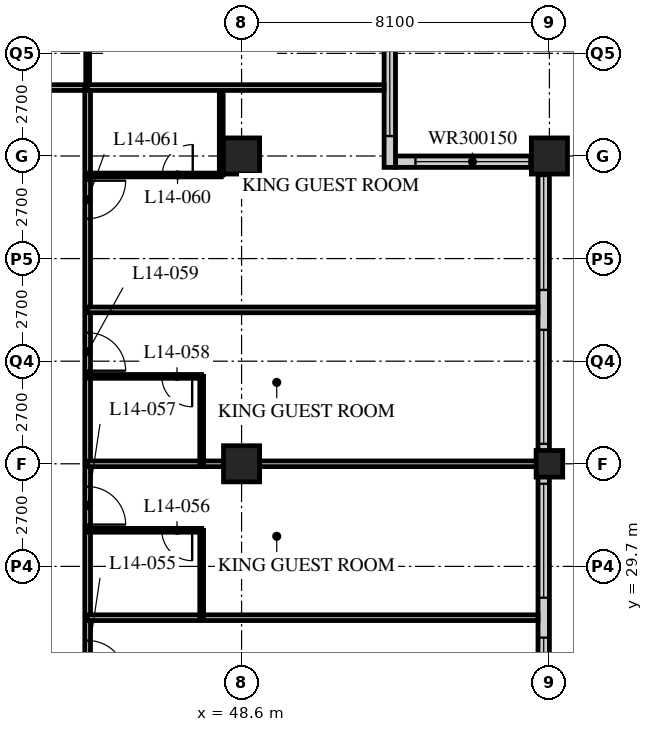
"""IFC4 building model, lengths in metres.
Left out: names, types, materials, properties, quantities, classifications, styles, units other than length and angle.
Written with IfcOpenShell. Run it as: python <this file> out.ifc"""

import sys

from ifc_helpers import new_model, si_unit, direction, frame, frame_2d, origin, origin_2d, place, context, subcontext, project, spatial, rectangle, hollow_rectangle, extrude, element, fill, save


model = new_model("IFC4")
c1 = context("Model", 3, precision=1e-05, world=origin(), true_north=direction((0.0, 1.0)))
c2 = subcontext(c1, "Body", "Model", "MODEL_VIEW")
j1 = project(units=[si_unit("LENGTHUNIT", "METRE"), si_unit("PLANEANGLEUNIT", "RADIAN")], contexts=[c1])
p1 = place(None, origin())
s1 = spatial("IfcSite", under=j1, at=p1, CompositionType="ELEMENT")
p2 = place(p1, origin())
s2 = spatial("IfcBuilding", under=s1, at=p2, CompositionType="ELEMENT")
p3 = place(p2, frame((0.0, 0.0, 60.2)))
s3 = spatial("IfcBuildingStorey", under=s2, at=p3, CompositionType="ELEMENT", Elevation=60.2)
for number, where, z_axis, x_axis in (
    (1, (48.6, 32.4, 0.0), (0.0, 0.0, 1.0), (1.0, 0.0, 0.0)),
    (2, (48.6, 40.5, 0.0), (0.0, 0.0, 1.0), (1.0, 0.0, 0.0)),
):
    element("IfcColumn", number, at=place(p3, frame(where, z_axis=z_axis, x_axis=x_axis)), inside=s3, PredefinedType="COLUMN", context=c2, shape_type="SweptSolid", body=[
        extrude(hollow_rectangle(XDim=0.95, YDim=0.95, WallThickness=0.095, at=origin_2d()), origin(), (0.0, 0.0, 1.0), 3.4),
    ])
p4 = place(p3, frame((56.7, 32.4, 0.0), z_axis=(0.0, 0.0, 1.0), x_axis=(1.0, 0.0, 0.0)))
e3 = element("IfcColumn", 3, at=p4, inside=s3, PredefinedType="COLUMN", context=c2, shape_type="SweptSolid", body=[
    extrude(hollow_rectangle(XDim=0.7, YDim=0.7, WallThickness=0.06, at=origin_2d()), origin(), (0.0, 0.0, 1.0), 3.4),
])
p5 = place(p3, frame((56.7, 40.5, 0.0), z_axis=(0.0, 0.0, 1.0), x_axis=(1.0, 0.0, 0.0)))
e4 = element("IfcColumn", 4, at=p5, inside=s3, PredefinedType="COLUMN", context=c2, shape_type="SweptSolid", body=[
    extrude(hollow_rectangle(XDim=0.95, YDim=0.95, WallThickness=0.095, at=origin_2d()), origin(), (0.0, 0.0, 1.0), 3.4),
])
p6 = place(p3, frame((56.55, 8.4, 0.0), z_axis=(0.0, 0.0, 1.0), x_axis=(0.0, 1.0, 0.0)))
e5 = element("IfcWall", 5, at=p6, inside=s3, PredefinedType="SOLIDWALL", context=c2, shape_type="SweptSolid", body=[
    extrude(rectangle(XDim=32.1, YDim=0.3, at=frame_2d((16.05, 0.0))), origin(), (0.0, 0.0, 1.0), 3.19),
])
p7 = place(p6, frame((0.225, 0.0, 0.9)))
e6 = element("IfcOpeningElement", 6, at=p7, cuts=e5, PredefinedType="OPENING", context=c2, shape_type="SweptSolid", body=[
    extrude(rectangle(XDim=3.0, YDim=2.0, at=frame_2d((1.5, 1.0))), frame((0.0, 0.16, 0.0), z_axis=(0.0, -1.0, 0.0), x_axis=(1.0, 0.0, 0.0)), (0.0, 0.0, 1.0), 0.32),
])
p8 = place(p6, frame((4.275, 0.0, 0.9)))
e7 = element("IfcOpeningElement", 7, at=p8, cuts=e5, PredefinedType="OPENING", context=c2, shape_type="SweptSolid", body=[
    extrude(rectangle(XDim=3.0, YDim=2.0, at=frame_2d((1.5, 1.0))), frame((0.0, 0.16, 0.0), z_axis=(0.0, -1.0, 0.0), x_axis=(1.0, 0.0, 0.0)), (0.0, 0.0, 1.0), 0.32),
])
p9 = place(p6, frame((8.325, 0.0, 0.9)))
e8 = element("IfcOpeningElement", 8, at=p9, cuts=e5, PredefinedType="OPENING", context=c2, shape_type="SweptSolid", body=[
    extrude(rectangle(XDim=3.0, YDim=2.0, at=frame_2d((1.5, 1.0))), frame((0.0, 0.16, 0.0), z_axis=(0.0, -1.0, 0.0), x_axis=(1.0, 0.0, 0.0)), (0.0, 0.0, 1.0), 0.32),
])
p10 = place(p6, frame((12.375, 0.0, 0.9)))
e9 = element("IfcOpeningElement", 9, at=p10, cuts=e5, PredefinedType="OPENING", context=c2, shape_type="SweptSolid", body=[
    extrude(rectangle(XDim=3.0, YDim=2.0, at=frame_2d((1.5, 1.0))), frame((0.0, 0.16, 0.0), z_axis=(0.0, -1.0, 0.0), x_axis=(1.0, 0.0, 0.0)), (0.0, 0.0, 1.0), 0.32),
])
p11 = place(p6, frame((16.425, 0.0, 0.9)))
e10 = element("IfcOpeningElement", 10, at=p11, cuts=e5, PredefinedType="OPENING", context=c2, shape_type="SweptSolid", body=[
    extrude(rectangle(XDim=3.0, YDim=2.0, at=frame_2d((1.5, 1.0))), frame((0.0, 0.16, 0.0), z_axis=(0.0, -1.0, 0.0), x_axis=(1.0, 0.0, 0.0)), (0.0, 0.0, 1.0), 0.32),
])
p12 = place(p6, frame((20.475, 0.0, 0.9)))
e11 = element("IfcOpeningElement", 11, at=p12, cuts=e5, PredefinedType="OPENING", context=c2, shape_type="SweptSolid", body=[
    extrude(rectangle(XDim=3.0, YDim=2.0, at=frame_2d((1.5, 1.0))), frame((0.0, 0.16, 0.0), z_axis=(0.0, -1.0, 0.0), x_axis=(1.0, 0.0, 0.0)), (0.0, 0.0, 1.0), 0.32),
])
p13 = place(p6, frame((24.525, 0.0, 0.9)))
e12 = element("IfcOpeningElement", 12, at=p13, cuts=e5, PredefinedType="OPENING", context=c2, shape_type="SweptSolid", body=[
    extrude(rectangle(XDim=3.0, YDim=2.0, at=frame_2d((1.5, 1.0))), frame((0.0, 0.16, 0.0), z_axis=(0.0, -1.0, 0.0), x_axis=(1.0, 0.0, 0.0)), (0.0, 0.0, 1.0), 0.32),
])
p14 = place(p6, frame((28.575, 0.0, 0.9)))
e13 = element("IfcOpeningElement", 13, at=p14, cuts=e5, PredefinedType="OPENING", context=c2, shape_type="SweptSolid", body=[
    extrude(rectangle(XDim=3.0, YDim=2.0, at=frame_2d((1.5, 1.0))), frame((0.0, 0.16, 0.0), z_axis=(0.0, -1.0, 0.0), x_axis=(1.0, 0.0, 0.0)), (0.0, 0.0, 1.0), 0.32),
])
p15 = place(p3, frame((56.4, 40.35, 0.0), z_axis=(0.0, 0.0, 1.0), x_axis=(-1.0, 0.0, 0.0)))
e14 = element("IfcWall", 14, at=p15, inside=s3, PredefinedType="SOLIDWALL", context=c2, shape_type="SweptSolid", body=[
    extrude(rectangle(XDim=3.75, YDim=0.3, at=frame_2d((1.875, 0.0))), origin(), (0.0, 0.0, 1.0), 3.19),
])
p16 = place(p15, frame((0.225, 0.0, 0.9)))
e15 = element("IfcOpeningElement", 15, at=p16, cuts=e14, PredefinedType="OPENING", context=c2, shape_type="SweptSolid", body=[
    extrude(rectangle(XDim=3.0, YDim=1.5, at=frame_2d((1.5, 0.75))), frame((0.0, 0.16, 0.0), z_axis=(0.0, -1.0, 0.0), x_axis=(1.0, 0.0, 0.0)), (0.0, 0.0, 1.0), 0.32),
])
p17 = place(p3, frame((52.5, 40.2, 0.0), z_axis=(0.0, 0.0, 1.0), x_axis=(0.0, 1.0, 0.0)))
e16 = element("IfcWall", 16, at=p17, inside=s3, PredefinedType="SOLIDWALL", context=c2, shape_type="SweptSolid", body=[
    extrude(rectangle(XDim=4.35, YDim=0.3, at=frame_2d((2.175, 0.0))), origin(), (0.0, 0.0, 1.0), 3.19),
])
p18 = place(p17, frame((0.825, 0.0, 0.9)))
e17 = element("IfcOpeningElement", 17, at=p18, cuts=e16, PredefinedType="OPENING", context=c2, shape_type="SweptSolid", body=[
    extrude(rectangle(XDim=3.0, YDim=1.5, at=frame_2d((1.5, 0.75))), frame((0.0, 0.16, 0.0), z_axis=(0.0, -1.0, 0.0), x_axis=(1.0, 0.0, 0.0)), (0.0, 0.0, 1.0), 0.32),
])
p19 = place(p3, frame((12.15, 42.3, 0.0), z_axis=(0.0, 0.0, 1.0), x_axis=(1.0, 0.0, 0.0)))
e18 = element("IfcWall", 18, at=p19, inside=s3, PredefinedType="PARTITIONING", context=c2, shape_type="SweptSolid", body=[
    extrude(rectangle(XDim=32.4, YDim=0.15, at=frame_2d((16.2, 0.0))), origin(), (0.0, 0.0, 1.0), 3.19),
])
p20 = place(p19, frame((6.5, 0.0, 0.0)))
e19 = element("IfcOpeningElement", 19, at=p20, cuts=e18, PredefinedType="OPENING", context=c2, shape_type="SweptSolid", body=[
    extrude(rectangle(XDim=1.0, YDim=2.1, at=frame_2d((0.5, 1.05))), frame((0.0, 0.085, 0.0), z_axis=(0.0, -1.0, 0.0), x_axis=(1.0, 0.0, 0.0)), (0.0, 0.0, 1.0), 0.17),
])
p21 = place(p19, frame((10.55, 0.0, 0.0)))
e20 = element("IfcOpeningElement", 20, at=p21, cuts=e18, PredefinedType="OPENING", context=c2, shape_type="SweptSolid", body=[
    extrude(rectangle(XDim=1.0, YDim=2.1, at=frame_2d((0.5, 1.05))), frame((0.0, 0.085, 0.0), z_axis=(0.0, -1.0, 0.0), x_axis=(1.0, 0.0, 0.0)), (0.0, 0.0, 1.0), 0.17),
])
p22 = place(p19, frame((14.6, 0.0, 0.0)))
e21 = element("IfcOpeningElement", 21, at=p22, cuts=e18, PredefinedType="OPENING", context=c2, shape_type="SweptSolid", body=[
    extrude(rectangle(XDim=1.0, YDim=2.1, at=frame_2d((0.5, 1.05))), frame((0.0, 0.085, 0.0), z_axis=(0.0, -1.0, 0.0), x_axis=(1.0, 0.0, 0.0)), (0.0, 0.0, 1.0), 0.17),
])
p23 = place(p19, frame((18.65, 0.0, 0.0)))
e22 = element("IfcOpeningElement", 22, at=p23, cuts=e18, PredefinedType="OPENING", context=c2, shape_type="SweptSolid", body=[
    extrude(rectangle(XDim=1.0, YDim=2.1, at=frame_2d((0.5, 1.05))), frame((0.0, 0.085, 0.0), z_axis=(0.0, -1.0, 0.0), x_axis=(1.0, 0.0, 0.0)), (0.0, 0.0, 1.0), 0.17),
])
p24 = place(p19, frame((22.7, 0.0, 0.0)))
e23 = element("IfcOpeningElement", 23, at=p24, cuts=e18, PredefinedType="OPENING", context=c2, shape_type="SweptSolid", body=[
    extrude(rectangle(XDim=1.0, YDim=2.1, at=frame_2d((0.5, 1.05))), frame((0.0, 0.085, 0.0), z_axis=(0.0, -1.0, 0.0), x_axis=(1.0, 0.0, 0.0)), (0.0, 0.0, 1.0), 0.17),
])
p25 = place(p19, frame((26.75, 0.0, 0.0)))
e24 = element("IfcOpeningElement", 24, at=p25, cuts=e18, PredefinedType="OPENING", context=c2, shape_type="SweptSolid", body=[
    extrude(rectangle(XDim=1.0, YDim=2.1, at=frame_2d((0.5, 1.05))), frame((0.0, 0.085, 0.0), z_axis=(0.0, -1.0, 0.0), x_axis=(1.0, 0.0, 0.0)), (0.0, 0.0, 1.0), 0.17),
])
p26 = place(p19, frame((28.775, 0.0, 0.0)))
e25 = element("IfcOpeningElement", 25, at=p26, cuts=e18, PredefinedType="OPENING", context=c2, shape_type="SweptSolid", body=[
    extrude(rectangle(XDim=1.0, YDim=2.1, at=frame_2d((0.5, 1.05))), frame((0.0, 0.085, 0.0), z_axis=(0.0, -1.0, 0.0), x_axis=(1.0, 0.0, 0.0)), (0.0, 0.0, 1.0), 0.17),
])
p27 = place(p19, frame((2.625, 0.0, 0.0)))
e26 = element("IfcOpeningElement", 26, at=p27, cuts=e18, PredefinedType="OPENING", context=c2, shape_type="SweptSolid", body=[
    extrude(rectangle(XDim=1.0, YDim=2.1, at=frame_2d((0.5, 1.05))), frame((0.0, 0.085, 0.0), z_axis=(0.0, -1.0, 0.0), x_axis=(1.0, 0.0, 0.0)), (0.0, 0.0, 1.0), 0.17),
])
p28 = place(p3, frame((44.55, 12.15, 0.0), z_axis=(0.0, 0.0, 1.0), x_axis=(0.0, 1.0, 0.0)))
e27 = element("IfcWall", 27, at=p28, inside=s3, PredefinedType="PARTITIONING", context=c2, shape_type="SweptSolid", body=[
    extrude(rectangle(XDim=30.15, YDim=0.15, at=frame_2d((15.075, 0.0))), origin(), (0.0, 0.0, 1.0), 3.19),
])
p29 = place(p28, frame((2.75, 0.0, 0.0)))
e28 = element("IfcOpeningElement", 28, at=p29, cuts=e27, PredefinedType="OPENING", context=c2, shape_type="SweptSolid", body=[
    extrude(rectangle(XDim=1.0, YDim=2.1, at=frame_2d((0.5, 1.05))), frame((0.0, 0.085, 0.0), z_axis=(0.0, -1.0, 0.0), x_axis=(1.0, 0.0, 0.0)), (0.0, 0.0, 1.0), 0.17),
])
p30 = place(p28, frame((6.5, 0.0, 0.0)))
e29 = element("IfcOpeningElement", 29, at=p30, cuts=e27, PredefinedType="OPENING", context=c2, shape_type="SweptSolid", body=[
    extrude(rectangle(XDim=1.0, YDim=2.1, at=frame_2d((0.5, 1.05))), frame((0.0, 0.085, 0.0), z_axis=(0.0, -1.0, 0.0), x_axis=(1.0, 0.0, 0.0)), (0.0, 0.0, 1.0), 0.17),
])
p31 = place(p28, frame((10.55, 0.0, 0.0)))
e30 = element("IfcOpeningElement", 30, at=p31, cuts=e27, PredefinedType="OPENING", context=c2, shape_type="SweptSolid", body=[
    extrude(rectangle(XDim=1.0, YDim=2.1, at=frame_2d((0.5, 1.05))), frame((0.0, 0.085, 0.0), z_axis=(0.0, -1.0, 0.0), x_axis=(1.0, 0.0, 0.0)), (0.0, 0.0, 1.0), 0.17),
])
p32 = place(p28, frame((14.6, 0.0, 0.0)))
e31 = element("IfcOpeningElement", 31, at=p32, cuts=e27, PredefinedType="OPENING", context=c2, shape_type="SweptSolid", body=[
    extrude(rectangle(XDim=1.0, YDim=2.1, at=frame_2d((0.5, 1.05))), frame((0.0, 0.085, 0.0), z_axis=(0.0, -1.0, 0.0), x_axis=(1.0, 0.0, 0.0)), (0.0, 0.0, 1.0), 0.17),
])
p33 = place(p28, frame((18.65, 0.0, 0.0)))
e32 = element("IfcOpeningElement", 32, at=p33, cuts=e27, PredefinedType="OPENING", context=c2, shape_type="SweptSolid", body=[
    extrude(rectangle(XDim=1.0, YDim=2.1, at=frame_2d((0.5, 1.05))), frame((0.0, 0.085, 0.0), z_axis=(0.0, -1.0, 0.0), x_axis=(1.0, 0.0, 0.0)), (0.0, 0.0, 1.0), 0.17),
])
p34 = place(p28, frame((22.7, 0.0, 0.0)))
e33 = element("IfcOpeningElement", 33, at=p34, cuts=e27, PredefinedType="OPENING", context=c2, shape_type="SweptSolid", body=[
    extrude(rectangle(XDim=1.0, YDim=2.1, at=frame_2d((0.5, 1.05))), frame((0.0, 0.085, 0.0), z_axis=(0.0, -1.0, 0.0), x_axis=(1.0, 0.0, 0.0)), (0.0, 0.0, 1.0), 0.17),
])
p35 = place(p28, frame((26.7, 0.0, 0.0)))
e34 = element("IfcOpeningElement", 34, at=p35, cuts=e27, PredefinedType="OPENING", context=c2, shape_type="SweptSolid", body=[
    extrude(rectangle(XDim=1.0, YDim=2.1, at=frame_2d((0.5, 1.05))), frame((0.0, 0.085, 0.0), z_axis=(0.0, -1.0, 0.0), x_axis=(1.0, 0.0, 0.0)), (0.0, 0.0, 1.0), 0.17),
])
p36 = place(p3, frame((44.55, 28.35, 0.0), z_axis=(0.0, 0.0, 1.0), x_axis=(1.0, 0.0, 0.0)))
e35 = element("IfcWall", 35, at=p36, inside=s3, PredefinedType="PARTITIONING", context=c2, shape_type="SweptSolid", body=[
    extrude(rectangle(XDim=11.85, YDim=0.15, at=frame_2d((5.925, 0.0))), origin(), (0.0, 0.0, 1.0), 3.19),
])
p37 = place(p3, frame((47.55, 28.35, 0.0), z_axis=(0.0, 0.0, 1.0), x_axis=(0.0, 1.0, 0.0)))
e36 = element("IfcWall", 36, at=p37, inside=s3, PredefinedType="PARTITIONING", context=c2, shape_type="SweptSolid", body=[
    extrude(rectangle(XDim=2.3, YDim=0.1, at=frame_2d((1.15, 0.0))), origin(), (0.0, 0.0, 1.0), 3.19),
])
p38 = place(p3, frame((44.55, 30.65, 0.0), z_axis=(0.0, 0.0, 1.0), x_axis=(1.0, 0.0, 0.0)))
e37 = element("IfcWall", 37, at=p38, inside=s3, PredefinedType="PARTITIONING", context=c2, shape_type="SweptSolid", body=[
    extrude(rectangle(XDim=3.0, YDim=0.1, at=frame_2d((1.5, 0.0))), origin(), (0.0, 0.0, 1.0), 3.19),
])
p39 = place(p38, frame((1.95, 0.0, 0.0)))
e38 = element("IfcOpeningElement", 38, at=p39, cuts=e37, PredefinedType="OPENING", context=c2, shape_type="SweptSolid", body=[
    extrude(rectangle(XDim=0.8, YDim=2.1, at=frame_2d((0.4, 1.05))), frame((0.0, 0.06, 0.0), z_axis=(0.0, -1.0, 0.0), x_axis=(1.0, 0.0, 0.0)), (0.0, 0.0, 1.0), 0.12),
])
p40 = place(p3, frame((44.55, 32.4, 0.0), z_axis=(0.0, 0.0, 1.0), x_axis=(1.0, 0.0, 0.0)))
e39 = element("IfcWall", 39, at=p40, inside=s3, PredefinedType="PARTITIONING", context=c2, shape_type="SweptSolid", body=[
    extrude(rectangle(XDim=11.85, YDim=0.15, at=frame_2d((5.925, 0.0))), origin(), (0.0, 0.0, 1.0), 2.578),
])
p41 = place(p3, frame((47.55, 32.4, 0.0), z_axis=(0.0, 0.0, 1.0), x_axis=(0.0, 1.0, 0.0)))
e40 = element("IfcWall", 40, at=p41, inside=s3, PredefinedType="PARTITIONING", context=c2, shape_type="SweptSolid", body=[
    extrude(rectangle(XDim=2.3, YDim=0.1, at=frame_2d((1.15, 0.0))), origin(), (0.0, 0.0, 1.0), 3.19),
])
p42 = place(p3, frame((44.55, 34.7, 0.0), z_axis=(0.0, 0.0, 1.0), x_axis=(1.0, 0.0, 0.0)))
e41 = element("IfcWall", 41, at=p42, inside=s3, PredefinedType="PARTITIONING", context=c2, shape_type="SweptSolid", body=[
    extrude(rectangle(XDim=3.0, YDim=0.1, at=frame_2d((1.5, 0.0))), origin(), (0.0, 0.0, 1.0), 3.19),
])
p43 = place(p42, frame((1.95, 0.0, 0.0)))
e42 = element("IfcOpeningElement", 42, at=p43, cuts=e41, PredefinedType="OPENING", context=c2, shape_type="SweptSolid", body=[
    extrude(rectangle(XDim=0.8, YDim=2.1, at=frame_2d((0.4, 1.05))), frame((0.0, 0.06, 0.0), z_axis=(0.0, -1.0, 0.0), x_axis=(1.0, 0.0, 0.0)), (0.0, 0.0, 1.0), 0.12),
])
p44 = place(p3, frame((44.55, 36.45, 0.0), z_axis=(0.0, 0.0, 1.0), x_axis=(1.0, 0.0, 0.0)))
e43 = element("IfcWall", 43, at=p44, inside=s3, PredefinedType="PARTITIONING", context=c2, shape_type="SweptSolid", body=[
    extrude(rectangle(XDim=11.85, YDim=0.15, at=frame_2d((5.925, 0.0))), origin(), (0.0, 0.0, 1.0), 3.19),
])
p45 = place(p3, frame((48.065, 40.0, 0.0), z_axis=(0.0, 0.0, 1.0), x_axis=(0.0, 1.0, 0.0)))
e44 = element("IfcWall", 44, at=p45, inside=s3, PredefinedType="PARTITIONING", context=c2, shape_type="SweptSolid", body=[
    extrude(rectangle(XDim=2.3, YDim=0.1, at=frame_2d((1.15, 0.0))), origin(), (0.0, 0.0, 1.0), 3.19),
])
p46 = place(p3, frame((44.55, 40.0, 0.0), z_axis=(0.0, 0.0, 1.0), x_axis=(1.0, 0.0, 0.0)))
e45 = element("IfcWall", 45, at=p46, inside=s3, PredefinedType="PARTITIONING", context=c2, shape_type="SweptSolid", body=[
    extrude(rectangle(XDim=3.515, YDim=0.1, at=frame_2d((1.757, 0.0))), origin(), (0.0, 0.0, 1.0), 3.19),
])
p47 = place(p46, frame((1.965, 0.0, 0.0)))
e46 = element("IfcOpeningElement", 46, at=p47, cuts=e45, PredefinedType="OPENING", context=c2, shape_type="SweptSolid", body=[
    extrude(rectangle(XDim=0.8, YDim=2.1, at=frame_2d((0.4, 1.05))), frame((0.0, 0.06, 0.0), z_axis=(0.0, -1.0, 0.0), x_axis=(1.0, 0.0, 0.0)), (0.0, 0.0, 1.0), 0.12),
])
p48 = place(p3, frame((44.55, 42.3, 0.0), z_axis=(0.0, 0.0, 1.0), x_axis=(0.0, 1.0, 0.0)))
e47 = element("IfcWall", 47, at=p48, inside=s3, PredefinedType="PARTITIONING", context=c2, shape_type="SweptSolid", body=[
    extrude(rectangle(XDim=2.4, YDim=0.1, at=frame_2d((1.2, 0.0))), origin(), (0.0, 0.0, 1.0), 3.19),
])
p49 = place(p3, frame((44.55, 42.3, 0.0), z_axis=(0.0, 0.0, 1.0), x_axis=(1.0, 0.0, 0.0)))
e48 = element("IfcWall", 48, at=p49, inside=s3, PredefinedType="PARTITIONING", context=c2, shape_type="SweptSolid", body=[
    extrude(rectangle(XDim=7.8, YDim=0.15, at=frame_2d((3.9, 0.0))), origin(), (0.0, 0.0, 1.0), 3.19),
])
p50 = place(p11, origin())
e49 = element("IfcWindow", 49, at=p50, inside=s3, PartitioningType="SINGLE_PANEL", PredefinedType="WINDOW", context=c2, shape_type="SweptSolid", body=[
    extrude(rectangle(XDim=3.0, YDim=2.0, at=frame_2d((1.5, 1.0))), frame((0.0, 0.03, 0.0), z_axis=(0.0, -1.0, 0.0), x_axis=(1.0, 0.0, 0.0)), (0.0, 0.0, 1.0), 0.06),
])
fill(e10, e49)
p51 = place(p12, origin())
e50 = element("IfcWindow", 50, at=p51, inside=s3, PartitioningType="SINGLE_PANEL", PredefinedType="WINDOW", context=c2, shape_type="SweptSolid", body=[
    extrude(rectangle(XDim=3.0, YDim=2.0, at=frame_2d((1.5, 1.0))), frame((0.0, 0.03, 0.0), z_axis=(0.0, -1.0, 0.0), x_axis=(1.0, 0.0, 0.0)), (0.0, 0.0, 1.0), 0.06),
])
fill(e11, e50)
p52 = place(p13, origin())
e51 = element("IfcWindow", 51, at=p52, inside=s3, PartitioningType="SINGLE_PANEL", PredefinedType="WINDOW", context=c2, shape_type="SweptSolid", body=[
    extrude(rectangle(XDim=3.0, YDim=2.0, at=frame_2d((1.5, 1.0))), frame((0.0, 0.03, 0.0), z_axis=(0.0, -1.0, 0.0), x_axis=(1.0, 0.0, 0.0)), (0.0, 0.0, 1.0), 0.06),
])
fill(e12, e51)
p53 = place(p14, origin())
e52 = element("IfcWindow", 52, at=p53, inside=s3, PartitioningType="SINGLE_PANEL", PredefinedType="WINDOW", context=c2, shape_type="SweptSolid", body=[
    extrude(rectangle(XDim=3.0, YDim=2.0, at=frame_2d((1.5, 1.0))), frame((0.0, 0.03, 0.0), z_axis=(0.0, -1.0, 0.0), x_axis=(1.0, 0.0, 0.0)), (0.0, 0.0, 1.0), 0.06),
])
fill(e13, e52)
p54 = place(p16, origin())
e53 = element("IfcWindow", 53, at=p54, inside=s3, PartitioningType="SINGLE_PANEL", PredefinedType="WINDOW", context=c2, shape_type="SweptSolid", body=[
    extrude(rectangle(XDim=3.0, YDim=1.5, at=frame_2d((1.5, 0.75))), frame((0.0, 0.03, 0.0), z_axis=(0.0, -1.0, 0.0), x_axis=(1.0, 0.0, 0.0)), (0.0, 0.0, 1.0), 0.06),
])
fill(e15, e53)
p55 = place(p18, origin())
e54 = element("IfcWindow", 54, at=p55, inside=s3, PartitioningType="SINGLE_PANEL", PredefinedType="WINDOW", context=c2, shape_type="SweptSolid", body=[
    extrude(rectangle(XDim=3.0, YDim=1.5, at=frame_2d((1.5, 0.75))), frame((0.0, 0.03, 0.0), z_axis=(0.0, -1.0, 0.0), x_axis=(1.0, 0.0, 0.0)), (0.0, 0.0, 1.0), 0.06),
])
fill(e17, e54)
p56 = place(p32, origin())
e55 = element("IfcDoor", 55, at=p56, inside=s3, OperationType="SINGLE_SWING_RIGHT", PredefinedType="DOOR", context=c2, shape_type="SweptSolid", body=[
    extrude(rectangle(XDim=1.0, YDim=2.1, at=frame_2d((0.5, 1.05))), frame((0.0, 0.025, 0.0), z_axis=(0.0, -1.0, 0.0), x_axis=(1.0, 0.0, 0.0)), (0.0, 0.0, 1.0), 0.05),
])
fill(e31, e55)
p57 = place(p39, origin())
e56 = element("IfcDoor", 56, at=p57, inside=s3, OperationType="SINGLE_SWING_LEFT", PredefinedType="DOOR", context=c2, shape_type="SweptSolid", body=[
    extrude(rectangle(XDim=0.8, YDim=2.1, at=frame_2d((0.4, 1.05))), frame((0.0, 0.025, 0.0), z_axis=(0.0, -1.0, 0.0), x_axis=(1.0, 0.0, 0.0)), (0.0, 0.0, 1.0), 0.05),
])
fill(e38, e56)
p58 = place(p33, origin())
e57 = element("IfcDoor", 57, at=p58, inside=s3, OperationType="SINGLE_SWING_RIGHT", PredefinedType="DOOR", context=c2, shape_type="SweptSolid", body=[
    extrude(rectangle(XDim=1.0, YDim=2.1, at=frame_2d((0.5, 1.05))), frame((0.0, 0.025, 0.0), z_axis=(0.0, -1.0, 0.0), x_axis=(1.0, 0.0, 0.0)), (0.0, 0.0, 1.0), 0.05),
])
fill(e32, e57)
p59 = place(p43, origin())
e58 = element("IfcDoor", 58, at=p59, inside=s3, OperationType="SINGLE_SWING_LEFT", PredefinedType="DOOR", context=c2, shape_type="SweptSolid", body=[
    extrude(rectangle(XDim=0.8, YDim=2.1, at=frame_2d((0.4, 1.05))), frame((0.0, 0.025, 0.0), z_axis=(0.0, -1.0, 0.0), x_axis=(1.0, 0.0, 0.0)), (0.0, 0.0, 1.0), 0.05),
])
fill(e42, e58)
p60 = place(p34, origin())
e59 = element("IfcDoor", 59, at=p60, inside=s3, OperationType="SINGLE_SWING_RIGHT", PredefinedType="DOOR", context=c2, shape_type="SweptSolid", body=[
    extrude(rectangle(XDim=1.0, YDim=2.1, at=frame_2d((0.5, 1.05))), frame((0.0, 0.025, 0.0), z_axis=(0.0, -1.0, 0.0), x_axis=(1.0, 0.0, 0.0)), (0.0, 0.0, 1.0), 0.05),
])
fill(e33, e59)
p61 = place(p47, origin())
e60 = element("IfcDoor", 60, at=p61, inside=s3, OperationType="SINGLE_SWING_RIGHT", PredefinedType="DOOR", context=c2, shape_type="SweptSolid", body=[
    extrude(rectangle(XDim=0.8, YDim=2.1, at=frame_2d((0.4, 1.05))), frame((0.0, 0.025, 0.0), z_axis=(0.0, -1.0, 0.0), x_axis=(1.0, 0.0, 0.0)), (0.0, 0.0, 1.0), 0.05),
])
fill(e46, e60)
p62 = place(p35, origin())
e61 = element("IfcDoor", 61, at=p62, inside=s3, OperationType="SINGLE_SWING_LEFT", PredefinedType="DOOR", context=c2, shape_type="SweptSolid", body=[
    extrude(rectangle(XDim=1.0, YDim=2.1, at=frame_2d((0.5, 1.05))), frame((0.0, 0.025, 0.0), z_axis=(0.0, -1.0, 0.0), x_axis=(1.0, 0.0, 0.0)), (0.0, 0.0, 1.0), 0.05),
])
fill(e34, e61)
save(model, sys.argv[1])
